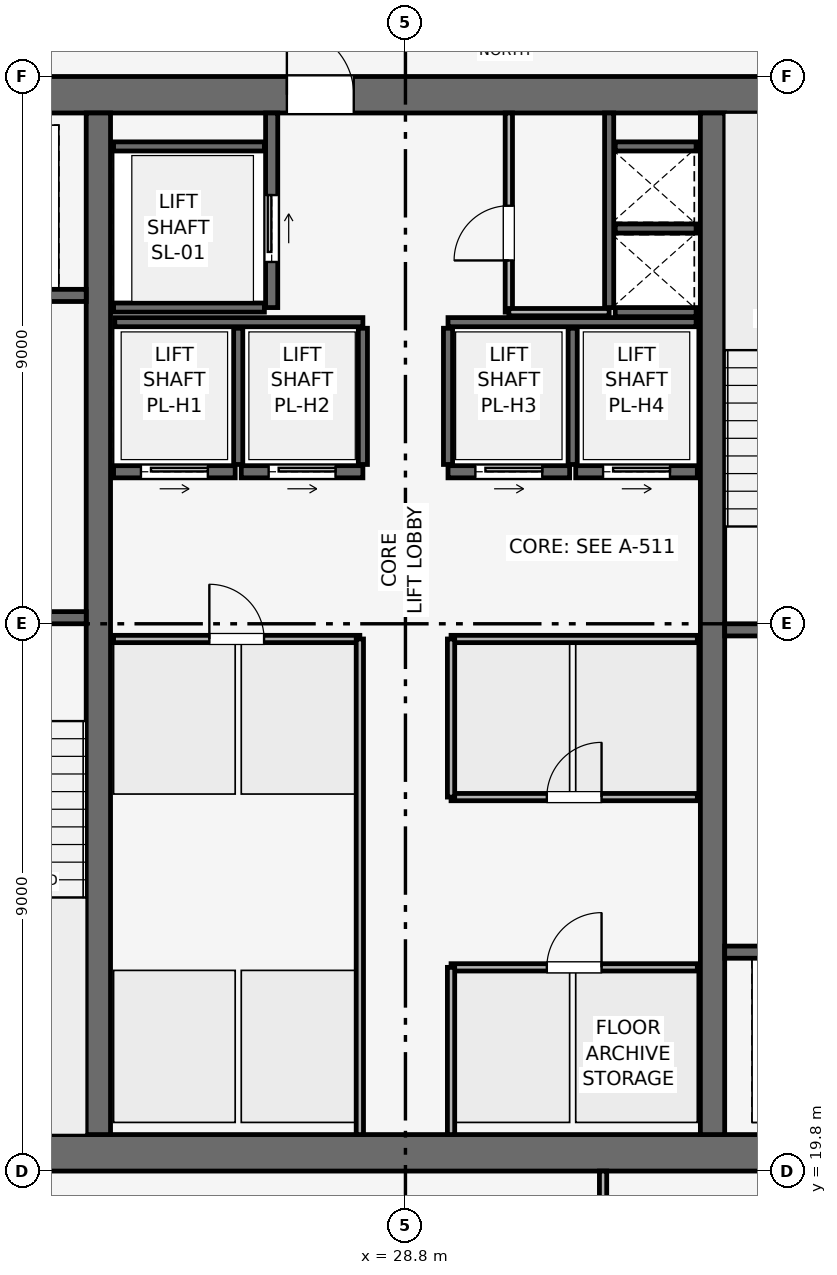
"""IFC4 building model, lengths in metres.
Left out: names, types, materials, properties, quantities, classifications, styles, units other than length and angle.
Written with IfcOpenShell. Run it as: python <this file> out.ifc"""

import sys

from ifc_helpers import new_model, si_unit, direction, frame, frame_2d, origin, place, context, subcontext, project, spatial, rectangle, extrude, element, fill, save


model = new_model("IFC4")
c1 = context("Model", 3, precision=1e-05, world=origin(), true_north=direction((0.0, 1.0)))
c2 = subcontext(c1, "Body", "Model", "MODEL_VIEW")
j1 = project(units=[si_unit("LENGTHUNIT", "METRE"), si_unit("PLANEANGLEUNIT", "RADIAN")], contexts=[c1])
p1 = place(None, origin())
s1 = spatial("IfcSite", under=j1, at=p1, CompositionType="ELEMENT")
p2 = place(p1, origin())
s2 = spatial("IfcBuilding", under=s1, at=p2, CompositionType="ELEMENT")
p3 = place(p2, frame((0.0, 0.0, 348.0)))
s3 = spatial("IfcBuildingStorey", under=s2, at=p3, CompositionType="ELEMENT", Elevation=348.0)
p4 = place(p3, frame((19.8, 20.1, 0.0), z_axis=(0.0, 0.0, 1.0), x_axis=(1.0, 0.0, 0.0)))
e1 = element("IfcWall", 1, at=p4, inside=s3, PredefinedType="SHEAR", context=c2, shape_type="SweptSolid", body=[
    extrude(rectangle(XDim=18.0, YDim=0.6, at=frame_2d((9.0, 0.0))), origin(), (0.0, 0.0, 1.0), 3.75),
])
p5 = place(p3, frame((19.8, 37.5, 0.0), z_axis=(0.0, 0.0, 1.0), x_axis=(1.0, 0.0, 0.0)))
e2 = element("IfcWall", 2, at=p5, inside=s3, PredefinedType="SHEAR", context=c2, shape_type="SweptSolid", body=[
    extrude(rectangle(XDim=18.0, YDim=0.6, at=frame_2d((9.0, 0.0))), origin(), (0.0, 0.0, 1.0), 3.75),
])
p6 = place(p5, frame((7.05, 0.0, 0.0)))
e3 = element("IfcOpeningElement", 3, at=p6, cuts=e2, PredefinedType="OPENING", context=c2, shape_type="SweptSolid", body=[
    extrude(rectangle(XDim=1.1, YDim=2.15, at=frame_2d((0.55, 1.075))), frame((0.0, 0.31, 0.0), z_axis=(0.0, -1.0, 0.0), x_axis=(1.0, 0.0, 0.0)), (0.0, 0.0, 1.0), 0.62),
])
for number, where, z_axis, x_axis in (
    (4, (23.75, 20.4, 0.0), (0.0, 0.0, 1.0), (0.0, 1.0, 0.0)),
    (5, (33.85, 20.4, 0.0), (0.0, 0.0, 1.0), (0.0, 1.0, 0.0)),
):
    element("IfcWall", number, at=place(p3, frame(where, z_axis=z_axis, x_axis=x_axis)), inside=s3, PredefinedType="SHEAR", context=c2, shape_type="SweptSolid", body=[
        extrude(rectangle(XDim=16.8, YDim=0.4, at=frame_2d((8.4, 0.0))), origin(), (0.0, 0.0, 1.0), 3.75),
    ])
p7 = place(p3, frame((20.4, 28.9, 0.0), z_axis=(0.0, 0.0, 1.0), x_axis=(1.0, 0.0, 0.0)))
e6 = element("IfcWall", 6, at=p7, inside=s3, PredefinedType="SHEAR", context=c2, shape_type="SweptSolid", body=[
    extrude(rectangle(XDim=3.15, YDim=0.2, at=frame_2d((1.575, 0.0))), origin(), (0.0, 0.0, 1.0), 3.51),
])
p8 = place(p7, frame((0.8, 0.0, 0.0)))
e7 = element("IfcOpeningElement", 7, at=p8, cuts=e6, PredefinedType="OPENING", context=c2, shape_type="SweptSolid", body=[
    extrude(rectangle(XDim=1.0, YDim=2.1, at=frame_2d((0.5, 1.05))), frame((0.0, 0.11, 0.0), z_axis=(0.0, -1.0, 0.0), x_axis=(1.0, 0.0, 0.0)), (0.0, 0.0, 1.0), 0.22),
])
p9 = place(p3, frame((34.05, 28.7, 0.0), z_axis=(0.0, 0.0, 1.0), x_axis=(1.0, 0.0, 0.0)))
e8 = element("IfcWall", 8, at=p9, inside=s3, PredefinedType="SHEAR", context=c2, shape_type="SweptSolid", body=[
    extrude(rectangle(XDim=3.15, YDim=0.2, at=frame_2d((1.575, 0.0))), origin(), (0.0, 0.0, 1.0), 3.51),
])
p10 = place(p9, frame((0.8, 0.0, 0.0)))
e9 = element("IfcOpeningElement", 9, at=p10, cuts=e8, PredefinedType="OPENING", context=c2, shape_type="SweptSolid", body=[
    extrude(rectangle(XDim=1.0, YDim=2.1, at=frame_2d((0.5, 1.05))), frame((0.0, 0.11, 0.0), z_axis=(0.0, -1.0, 0.0), x_axis=(1.0, 0.0, 0.0)), (0.0, 0.0, 1.0), 0.22),
])
p11 = place(p3, frame((32.15, 34.0, 0.0), z_axis=(0.0, 0.0, 1.0), x_axis=(0.0, 1.0, 0.0)))
e10 = element("IfcWall", 10, at=p11, inside=s3, PredefinedType="SHEAR", context=c2, shape_type="SweptSolid", body=[
    extrude(rectangle(XDim=3.2, YDim=0.15, at=frame_2d((1.6, 0.0))), origin(), (0.0, 0.0, 1.0), 3.51),
])
for number, where, z_axis, x_axis in (
    (11, (32.25, 33.925, 0.0), (0.0, 0.0, 1.0), (1.0, 0.0, 0.0)),
    (12, (32.25, 35.3, 0.0), (0.0, 0.0, 1.0), (1.0, 0.0, 0.0)),
):
    element("IfcWall", number, at=place(p3, frame(where, z_axis=z_axis, x_axis=x_axis)), inside=s3, PredefinedType="SHEAR", context=c2, shape_type="SweptSolid", body=[
        extrude(rectangle(XDim=1.33, YDim=0.15, at=frame_2d((0.665, 0.0))), origin(), (0.0, 0.0, 1.0), 3.51),
    ])
p12 = place(p3, frame((20.5, 34.2, 0.0), z_axis=(0.0, 0.0, 1.0), x_axis=(1.0, 0.0, 0.0)))
e13 = element("IfcWall", 13, at=p12, inside=s3, PredefinedType="SHEAR", context=c2, shape_type="SweptSolid", body=[
    extrude(rectangle(XDim=3.05, YDim=0.2, at=frame_2d((1.525, 0.0))), origin(), (0.0, 0.0, 1.0), 3.51),
])
p13 = place(p12, frame((0.75, 0.0, 0.0)))
e14 = element("IfcOpeningElement", 14, at=p13, cuts=e13, PredefinedType="OPENING", context=c2, shape_type="SweptSolid", body=[
    extrude(rectangle(XDim=1.1, YDim=2.15, at=frame_2d((0.55, 1.075))), frame((0.0, 0.11, 0.0), z_axis=(0.0, -1.0, 0.0), x_axis=(1.0, 0.0, 0.0)), (0.0, 0.0, 1.0), 0.22),
])
p14 = place(p3, frame((34.05, 23.4, 0.0), z_axis=(0.0, 0.0, 1.0), x_axis=(1.0, 0.0, 0.0)))
e15 = element("IfcWall", 15, at=p14, inside=s3, PredefinedType="SHEAR", context=c2, shape_type="SweptSolid", body=[
    extrude(rectangle(XDim=3.05, YDim=0.2, at=frame_2d((1.525, 0.0))), origin(), (0.0, 0.0, 1.0), 3.51),
])
p15 = place(p14, frame((1.2, 0.0, 0.0)))
e16 = element("IfcOpeningElement", 16, at=p15, cuts=e15, PredefinedType="OPENING", context=c2, shape_type="SweptSolid", body=[
    extrude(rectangle(XDim=1.1, YDim=2.15, at=frame_2d((0.55, 1.075))), frame((0.0, 0.11, 0.0), z_axis=(0.0, -1.0, 0.0), x_axis=(1.0, 0.0, 0.0)), (0.0, 0.0, 1.0), 0.22),
])
p16 = place(p3, frame((26.6, 34.0, 0.0), z_axis=(0.0, 0.0, 1.0), x_axis=(0.0, 1.0, 0.0)))
e17 = element("IfcWall", 17, at=p16, inside=s3, PredefinedType="SHEAR", context=c2, shape_type="SweptSolid", body=[
    extrude(rectangle(XDim=3.2, YDim=0.2, at=frame_2d((1.6, 0.0))), origin(), (0.0, 0.0, 1.0), 3.51),
])
p17 = place(p16, frame((0.75, 0.0, 0.0)))
e18 = element("IfcOpeningElement", 18, at=p17, cuts=e17, PredefinedType="OPENING", context=c2, shape_type="SweptSolid", body=[
    extrude(rectangle(XDim=1.1, YDim=2.15, at=frame_2d((0.55, 1.075))), frame((0.0, 0.11, 0.0), z_axis=(0.0, -1.0, 0.0), x_axis=(1.0, 0.0, 0.0)), (0.0, 0.0, 1.0), 0.22),
])
for number, where, z_axis, x_axis in (
    (19, (24.0, 34.0, 0.0), (0.0, 0.0, 1.0), (1.0, 0.0, 0.0)),
    (20, (24.0, 36.65, 0.0), (0.0, 0.0, 1.0), (1.0, 0.0, 0.0)),
):
    element("IfcWall", number, at=place(p3, frame(where, z_axis=z_axis, x_axis=x_axis)), inside=s3, PredefinedType="SHEAR", context=c2, shape_type="SweptSolid", body=[
        extrude(rectangle(XDim=2.48, YDim=0.15, at=frame_2d((1.24, 0.0))), origin(), (0.0, 0.0, 1.0), 3.51),
    ])
p18 = place(p3, frame((24.0, 31.3, 0.0), z_axis=(0.0, 0.0, 1.0), x_axis=(1.0, 0.0, 0.0)))
e21 = element("IfcWall", 21, at=p18, inside=s3, PredefinedType="SHEAR", context=c2, shape_type="SweptSolid", body=[
    extrude(rectangle(XDim=2.0, YDim=0.2, at=frame_2d((1.0, 0.0))), origin(), (0.0, 0.0, 1.0), 3.51),
])
p19 = place(p18, frame((0.45, 0.0, 0.0)))
e22 = element("IfcOpeningElement", 22, at=p19, cuts=e21, PredefinedType="OPENING", context=c2, shape_type="SweptSolid", body=[
    extrude(rectangle(XDim=1.1, YDim=2.15, at=frame_2d((0.55, 1.075))), frame((0.0, 0.11, 0.0), z_axis=(0.0, -1.0, 0.0), x_axis=(1.0, 0.0, 0.0)), (0.0, 0.0, 1.0), 0.22),
])
p20 = place(p3, frame((26.1, 31.3, 0.0), z_axis=(0.0, 0.0, 1.0), x_axis=(1.0, 0.0, 0.0)))
e23 = element("IfcWall", 23, at=p20, inside=s3, PredefinedType="SHEAR", context=c2, shape_type="SweptSolid", body=[
    extrude(rectangle(XDim=2.0, YDim=0.2, at=frame_2d((1.0, 0.0))), origin(), (0.0, 0.0, 1.0), 3.51),
])
p21 = place(p20, frame((0.45, 0.0, 0.0)))
e24 = element("IfcOpeningElement", 24, at=p21, cuts=e23, PredefinedType="OPENING", context=c2, shape_type="SweptSolid", body=[
    extrude(rectangle(XDim=1.1, YDim=2.15, at=frame_2d((0.55, 1.075))), frame((0.0, 0.11, 0.0), z_axis=(0.0, -1.0, 0.0), x_axis=(1.0, 0.0, 0.0)), (0.0, 0.0, 1.0), 0.22),
])
p22 = place(p3, frame((29.5, 31.3, 0.0), z_axis=(0.0, 0.0, 1.0), x_axis=(1.0, 0.0, 0.0)))
e25 = element("IfcWall", 25, at=p22, inside=s3, PredefinedType="SHEAR", context=c2, shape_type="SweptSolid", body=[
    extrude(rectangle(XDim=2.0, YDim=0.2, at=frame_2d((1.0, 0.0))), origin(), (0.0, 0.0, 1.0), 3.51),
])
p23 = place(p22, frame((0.45, 0.0, 0.0)))
e26 = element("IfcOpeningElement", 26, at=p23, cuts=e25, PredefinedType="OPENING", context=c2, shape_type="SweptSolid", body=[
    extrude(rectangle(XDim=1.1, YDim=2.15, at=frame_2d((0.55, 1.075))), frame((0.0, 0.11, 0.0), z_axis=(0.0, -1.0, 0.0), x_axis=(1.0, 0.0, 0.0)), (0.0, 0.0, 1.0), 0.22),
])
p24 = place(p3, frame((31.6, 31.3, 0.0), z_axis=(0.0, 0.0, 1.0), x_axis=(1.0, 0.0, 0.0)))
e27 = element("IfcWall", 27, at=p24, inside=s3, PredefinedType="SHEAR", context=c2, shape_type="SweptSolid", body=[
    extrude(rectangle(XDim=2.0, YDim=0.2, at=frame_2d((1.0, 0.0))), origin(), (0.0, 0.0, 1.0), 3.51),
])
p25 = place(p24, frame((0.45, 0.0, 0.0)))
e28 = element("IfcOpeningElement", 28, at=p25, cuts=e27, PredefinedType="OPENING", context=c2, shape_type="SweptSolid", body=[
    extrude(rectangle(XDim=1.1, YDim=2.15, at=frame_2d((0.55, 1.075))), frame((0.0, 0.11, 0.0), z_axis=(0.0, -1.0, 0.0), x_axis=(1.0, 0.0, 0.0)), (0.0, 0.0, 1.0), 0.22),
])
p26 = place(p3, frame((32.25, 36.65, 0.0), z_axis=(0.0, 0.0, 1.0), x_axis=(1.0, 0.0, 0.0)))
e29 = element("IfcWall", 29, at=p26, inside=s3, PredefinedType="SHEAR", context=c2, shape_type="SweptSolid", body=[
    extrude(rectangle(XDim=1.33, YDim=0.15, at=frame_2d((0.665, 0.0))), origin(), (0.0, 0.0, 1.0), 3.51),
])
for number, where, z_axis, x_axis in (
    (30, (24.02, 33.76, 0.0), (0.0, 0.0, 1.0), (1.0, 0.0, 0.0)),
    (31, (29.5, 33.76, 0.0), (0.0, 0.0, 1.0), (1.0, 0.0, 0.0)),
):
    element("IfcWall", number, at=place(p3, frame(where, z_axis=z_axis, x_axis=x_axis)), inside=s3, PredefinedType="SHEAR", context=c2, shape_type="SweptSolid", body=[
        extrude(rectangle(XDim=4.08, YDim=0.15, at=frame_2d((2.04, 0.0))), origin(), (0.0, 0.0, 1.0), 3.51),
    ])
for number, where, z_axis, x_axis in (
    (32, (26.05, 31.42, 0.0), (0.0, 0.0, 1.0), (0.0, 1.0, 0.0)),
    (33, (28.1, 31.42, 0.0), (0.0, 0.0, 1.0), (0.0, 1.0, 0.0)),
    (34, (29.5, 31.42, 0.0), (0.0, 0.0, 1.0), (0.0, 1.0, 0.0)),
    (35, (31.55, 31.42, 0.0), (0.0, 0.0, 1.0), (0.0, 1.0, 0.0)),
):
    element("IfcWall", number, at=place(p3, frame(where, z_axis=z_axis, x_axis=x_axis)), inside=s3, PredefinedType="SHEAR", context=c2, shape_type="SweptSolid", body=[
        extrude(rectangle(XDim=2.24, YDim=0.15, at=frame_2d((1.12, 0.0))), origin(), (0.0, 0.0, 1.0), 3.51),
    ])
p27 = place(p3, frame((30.5, 33.925, 0.0), z_axis=(0.0, 0.0, 1.0), x_axis=(0.0, 1.0, 0.0)))
e36 = element("IfcWall", 36, at=p27, inside=s3, PredefinedType="PARTITIONING", context=c2, shape_type="SweptSolid", body=[
    extrude(rectangle(XDim=3.275, YDim=0.12, at=frame_2d((1.637, 0.0))), origin(), (0.0, 0.0, 1.0), 3.51),
])
p28 = place(p27, frame((0.85, 0.0, 0.0)))
e37 = element("IfcOpeningElement", 37, at=p28, cuts=e36, PredefinedType="OPENING", context=c2, shape_type="SweptSolid", body=[
    extrude(rectangle(XDim=0.9, YDim=2.1, at=frame_2d((0.45, 1.05))), frame((0.0, 0.07, 0.0), z_axis=(0.0, -1.0, 0.0), x_axis=(1.0, 0.0, 0.0)), (0.0, 0.0, 1.0), 0.14),
])
p29 = place(p3, frame((30.5, 33.925, 0.0), z_axis=(0.0, 0.0, 1.0), x_axis=(1.0, 0.0, 0.0)))
e38 = element("IfcWall", 38, at=p29, inside=s3, PredefinedType="PARTITIONING", context=c2, shape_type="SweptSolid", body=[
    extrude(rectangle(XDim=1.65, YDim=0.12, at=frame_2d((0.825, 0.0))), origin(), (0.0, 0.0, 1.0), 3.51),
])
p30 = place(p3, frame((24.0, 28.55, 0.0), z_axis=(0.0, 0.0, 1.0), x_axis=(1.0, 0.0, 0.0)))
e39 = element("IfcWall", 39, at=p30, inside=s3, PredefinedType="PARTITIONING", context=c2, shape_type="SweptSolid", body=[
    extrude(rectangle(XDim=4.05, YDim=0.12, at=frame_2d((2.025, 0.0))), origin(), (0.0, 0.0, 1.0), 3.51),
])
p31 = place(p30, frame((1.575, 0.0, 0.0)))
e40 = element("IfcOpeningElement", 40, at=p31, cuts=e39, PredefinedType="OPENING", context=c2, shape_type="SweptSolid", body=[
    extrude(rectangle(XDim=0.9, YDim=2.1, at=frame_2d((0.45, 1.05))), frame((0.0, 0.07, 0.0), z_axis=(0.0, -1.0, 0.0), x_axis=(1.0, 0.0, 0.0)), (0.0, 0.0, 1.0), 0.14),
])
p32 = place(p3, frame((28.05, 20.4, 0.0), z_axis=(0.0, 0.0, 1.0), x_axis=(0.0, 1.0, 0.0)))
e41 = element("IfcWall", 41, at=p32, inside=s3, PredefinedType="PARTITIONING", context=c2, shape_type="SweptSolid", body=[
    extrude(rectangle(XDim=8.15, YDim=0.12, at=frame_2d((4.075, 0.0))), origin(), (0.0, 0.0, 1.0), 3.51),
])
p33 = place(p3, frame((29.55, 23.15, 0.0), z_axis=(0.0, 0.0, 1.0), x_axis=(1.0, 0.0, 0.0)))
e42 = element("IfcWall", 42, at=p33, inside=s3, PredefinedType="PARTITIONING", context=c2, shape_type="SweptSolid", body=[
    extrude(rectangle(XDim=4.05, YDim=0.12, at=frame_2d((2.025, 0.0))), origin(), (0.0, 0.0, 1.0), 3.51),
])
p34 = place(p33, frame((1.575, 0.0, 0.0)))
e43 = element("IfcOpeningElement", 43, at=p34, cuts=e42, PredefinedType="OPENING", context=c2, shape_type="SweptSolid", body=[
    extrude(rectangle(XDim=0.9, YDim=2.1, at=frame_2d((0.45, 1.05))), frame((0.0, 0.07, 0.0), z_axis=(0.0, -1.0, 0.0), x_axis=(1.0, 0.0, 0.0)), (0.0, 0.0, 1.0), 0.14),
])
p35 = place(p3, frame((29.55, 20.4, 0.0), z_axis=(0.0, 0.0, 1.0), x_axis=(0.0, 1.0, 0.0)))
e44 = element("IfcWall", 44, at=p35, inside=s3, PredefinedType="PARTITIONING", context=c2, shape_type="SweptSolid", body=[
    extrude(rectangle(XDim=2.75, YDim=0.12, at=frame_2d((1.375, 0.0))), origin(), (0.0, 0.0, 1.0), 3.51),
])
p36 = place(p3, frame((29.55, 25.95, 0.0), z_axis=(0.0, 0.0, 1.0), x_axis=(1.0, 0.0, 0.0)))
e45 = element("IfcWall", 45, at=p36, inside=s3, PredefinedType="PARTITIONING", context=c2, shape_type="SweptSolid", body=[
    extrude(rectangle(XDim=4.05, YDim=0.12, at=frame_2d((2.025, 0.0))), origin(), (0.0, 0.0, 1.0), 3.51),
])
p37 = place(p36, frame((1.575, 0.0, 0.0)))
e46 = element("IfcOpeningElement", 46, at=p37, cuts=e45, PredefinedType="OPENING", context=c2, shape_type="SweptSolid", body=[
    extrude(rectangle(XDim=0.9, YDim=2.1, at=frame_2d((0.45, 1.05))), frame((0.0, 0.07, 0.0), z_axis=(0.0, -1.0, 0.0), x_axis=(1.0, 0.0, 0.0)), (0.0, 0.0, 1.0), 0.14),
])
p38 = place(p3, frame((29.55, 28.55, 0.0), z_axis=(0.0, 0.0, 1.0), x_axis=(1.0, 0.0, 0.0)))
e47 = element("IfcWall", 47, at=p38, inside=s3, PredefinedType="PARTITIONING", context=c2, shape_type="SweptSolid", body=[
    extrude(rectangle(XDim=4.05, YDim=0.12, at=frame_2d((2.025, 0.0))), origin(), (0.0, 0.0, 1.0), 3.51),
])
p39 = place(p3, frame((29.55, 25.95, 0.0), z_axis=(0.0, 0.0, 1.0), x_axis=(0.0, 1.0, 0.0)))
e48 = element("IfcWall", 48, at=p39, inside=s3, PredefinedType="PARTITIONING", context=c2, shape_type="SweptSolid", body=[
    extrude(rectangle(XDim=2.6, YDim=0.12, at=frame_2d((1.3, 0.0))), origin(), (0.0, 0.0, 1.0), 3.51),
])
p40 = place(p3, frame((32.05, 7.63, 0.0), z_axis=(0.0, 0.0, 1.0), x_axis=(0.0, 1.0, 0.0)))
e49 = element("IfcWall", 49, at=p40, inside=s3, PredefinedType="PARTITIONING", context=c2, shape_type="SweptSolid", body=[
    extrude(rectangle(XDim=12.17, YDim=0.12, at=frame_2d((6.085, 0.0))), origin(), (0.0, 0.0, 1.0), 3.135),
])
p41 = place(p40, frame((9.77, 0.0, 0.0)))
e50 = element("IfcOpeningElement", 50, at=p41, cuts=e49, PredefinedType="OPENING", context=c2, shape_type="SweptSolid", body=[
    extrude(rectangle(XDim=0.9, YDim=2.1, at=frame_2d((0.45, 1.05))), frame((0.0, 0.07, 0.0), z_axis=(0.0, -1.0, 0.0), x_axis=(1.0, 0.0, 0.0)), (0.0, 0.0, 1.0), 0.14),
])
p42 = place(p17, origin())
e51 = element("IfcDoor", 51, at=p42, inside=s3, OperationType="SLIDING_TO_RIGHT", PredefinedType="DOOR", context=c2, shape_type="SweptSolid", body=[
    extrude(rectangle(XDim=1.1, YDim=2.15, at=frame_2d((0.55, 1.075))), frame((0.0, 0.025, 0.0), z_axis=(0.0, -1.0, 0.0), x_axis=(1.0, 0.0, 0.0)), (0.0, 0.0, 1.0), 0.05),
])
fill(e18, e51)
p43 = place(p19, origin())
e52 = element("IfcDoor", 52, at=p43, inside=s3, OperationType="SLIDING_TO_RIGHT", PredefinedType="DOOR", context=c2, shape_type="SweptSolid", body=[
    extrude(rectangle(XDim=1.1, YDim=2.15, at=frame_2d((0.55, 1.075))), frame((0.0, 0.025, 0.0), z_axis=(0.0, -1.0, 0.0), x_axis=(1.0, 0.0, 0.0)), (0.0, 0.0, 1.0), 0.05),
])
fill(e22, e52)
p44 = place(p21, origin())
e53 = element("IfcDoor", 53, at=p44, inside=s3, OperationType="SLIDING_TO_RIGHT", PredefinedType="DOOR", context=c2, shape_type="SweptSolid", body=[
    extrude(rectangle(XDim=1.1, YDim=2.15, at=frame_2d((0.55, 1.075))), frame((0.0, 0.025, 0.0), z_axis=(0.0, -1.0, 0.0), x_axis=(1.0, 0.0, 0.0)), (0.0, 0.0, 1.0), 0.05),
])
fill(e24, e53)
p45 = place(p23, origin())
e54 = element("IfcDoor", 54, at=p45, inside=s3, OperationType="SLIDING_TO_RIGHT", PredefinedType="DOOR", context=c2, shape_type="SweptSolid", body=[
    extrude(rectangle(XDim=1.1, YDim=2.15, at=frame_2d((0.55, 1.075))), frame((0.0, 0.025, 0.0), z_axis=(0.0, -1.0, 0.0), x_axis=(1.0, 0.0, 0.0)), (0.0, 0.0, 1.0), 0.05),
])
fill(e26, e54)
p46 = place(p25, origin())
e55 = element("IfcDoor", 55, at=p46, inside=s3, OperationType="SLIDING_TO_RIGHT", PredefinedType="DOOR", context=c2, shape_type="SweptSolid", body=[
    extrude(rectangle(XDim=1.1, YDim=2.15, at=frame_2d((0.55, 1.075))), frame((0.0, 0.025, 0.0), z_axis=(0.0, -1.0, 0.0), x_axis=(1.0, 0.0, 0.0)), (0.0, 0.0, 1.0), 0.05),
])
fill(e28, e55)
p47 = place(p28, origin())
e56 = element("IfcDoor", 56, at=p47, inside=s3, OperationType="SINGLE_SWING_LEFT", PredefinedType="DOOR", context=c2, shape_type="SweptSolid", body=[
    extrude(rectangle(XDim=0.9, YDim=2.1, at=frame_2d((0.45, 1.05))), frame((0.0, 0.025, 0.0), z_axis=(0.0, -1.0, 0.0), x_axis=(1.0, 0.0, 0.0)), (0.0, 0.0, 1.0), 0.05),
])
fill(e37, e56)
p48 = place(p31, origin())
e57 = element("IfcDoor", 57, at=p48, inside=s3, OperationType="SINGLE_SWING_LEFT", PredefinedType="DOOR", context=c2, shape_type="SweptSolid", body=[
    extrude(rectangle(XDim=0.9, YDim=2.1, at=frame_2d((0.45, 1.05))), frame((0.0, 0.025, 0.0), z_axis=(0.0, -1.0, 0.0), x_axis=(1.0, 0.0, 0.0)), (0.0, 0.0, 1.0), 0.05),
])
fill(e40, e57)
p49 = place(p34, origin())
e58 = element("IfcDoor", 58, at=p49, inside=s3, OperationType="SINGLE_SWING_RIGHT", PredefinedType="DOOR", context=c2, shape_type="SweptSolid", body=[
    extrude(rectangle(XDim=0.9, YDim=2.1, at=frame_2d((0.45, 1.05))), frame((0.0, 0.025, 0.0), z_axis=(0.0, -1.0, 0.0), x_axis=(1.0, 0.0, 0.0)), (0.0, 0.0, 1.0), 0.05),
])
fill(e43, e58)
p50 = place(p37, origin())
e59 = element("IfcDoor", 59, at=p50, inside=s3, OperationType="SINGLE_SWING_RIGHT", PredefinedType="DOOR", context=c2, shape_type="SweptSolid", body=[
    extrude(rectangle(XDim=0.9, YDim=2.1, at=frame_2d((0.45, 1.05))), frame((0.0, 0.025, 0.0), z_axis=(0.0, -1.0, 0.0), x_axis=(1.0, 0.0, 0.0)), (0.0, 0.0, 1.0), 0.05),
])
fill(e46, e59)
p51 = place(p6, origin())
e60 = element("IfcDoor", 60, at=p51, inside=s3, OperationType="SINGLE_SWING_LEFT", PredefinedType="DOOR", context=c2, shape_type="SweptSolid", body=[
    extrude(rectangle(XDim=1.1, YDim=2.15, at=frame_2d((0.55, 1.075))), frame((0.0, 0.025, 0.0), z_axis=(0.0, -1.0, 0.0), x_axis=(1.0, 0.0, 0.0)), (0.0, 0.0, 1.0), 0.05),
])
fill(e3, e60)
save(model, sys.argv[1])
